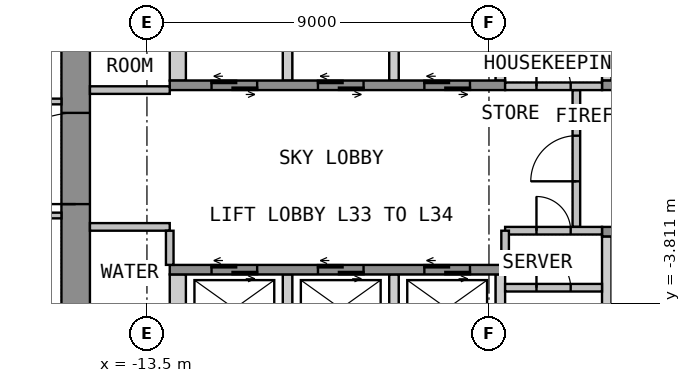
"""IFC4 building model, lengths in metres.
Left out: names, types, materials, properties, quantities, classifications, styles, units other than length and angle.
Written with IfcOpenShell. Run it as: python <this file> out.ifc"""

import sys

from ifc_helpers import new_model, si_unit, direction, frame, frame_2d, origin, place, context, subcontext, project, spatial, polyline, rectangle, outline, extrude, element, fill, save


model = new_model("IFC4")
c1 = context("Model", 3, precision=1e-05, world=origin(), true_north=direction((0.0, 1.0)))
c2 = subcontext(c1, "Body", "Model", "MODEL_VIEW")
j1 = project(units=[si_unit("LENGTHUNIT", "METRE"), si_unit("PLANEANGLEUNIT", "RADIAN")], contexts=[c1])
p1 = place(None, origin())
s1 = spatial("IfcSite", under=j1, at=p1, CompositionType="ELEMENT")
p2 = place(p1, origin())
s2 = spatial("IfcBuilding", under=s1, at=p2, CompositionType="ELEMENT")
p3 = place(p2, frame((0.0, 0.0, 132.6)))
s3 = spatial("IfcBuildingStorey", under=s2, at=p3, CompositionType="ELEMENT", Elevation=132.6)
p4 = place(p3, frame((-15.375, -12.75, 0.0), z_axis=(0.0, 0.0, 1.0), x_axis=(0.0, 1.0, 0.0)))
e1 = element("IfcWall", 1, at=p4, inside=s3, PredefinedType="SHEAR", context=c2, shape_type="SweptSolid", body=[
    extrude(rectangle(XDim=25.5, YDim=0.75, at=frame_2d((12.75, 0.0))), origin(), (0.0, 0.0, 1.0), 3.575),
])
p5 = place(p4, frame((11.55, 0.0, 0.0)))
e2 = element("IfcOpeningElement", 2, at=p5, cuts=e1, PredefinedType="OPENING", context=c2, shape_type="SweptSolid", body=[
    extrude(rectangle(XDim=2.4, YDim=2.1, at=frame_2d((1.2, 1.05))), frame((0.0, 0.385, 0.0), z_axis=(0.0, -1.0, 0.0), x_axis=(1.0, 0.0, 0.0)), (0.0, 0.0, 1.0), 0.77),
])
p6 = place(p3, origin())
e3 = element("IfcWall", 3, at=p6, inside=s3, PredefinedType="SHEAR", context=c2, shape_type="SweptSolid", body=[
    extrude(outline(polyline([(-12.9, 2.05), (-12.475, 2.05), (-12.475, 4.75), (-12.9, 4.75), (-12.9, 2.05)])), origin(), (0.0, 0.0, 1.0), 3.575),
])
p7 = place(p3, origin())
e4 = element("IfcWall", 4, at=p7, inside=s3, PredefinedType="SHEAR", context=c2, shape_type="SweptSolid", body=[
    extrude(outline(polyline([(-9.925, 2.05), (-9.675, 2.05), (-9.675, 4.75), (-9.925, 4.75), (-9.925, 2.05)])), origin(), (0.0, 0.0, 1.0), 3.575),
])
p8 = place(p3, origin())
e5 = element("IfcWall", 5, at=p8, inside=s3, PredefinedType="SHEAR", context=c2, shape_type="SweptSolid", body=[
    extrude(outline(polyline([(-7.125, 2.05), (-6.875, 2.05), (-6.875, 4.75), (-7.125, 4.75), (-7.125, 2.05)])), origin(), (0.0, 0.0, 1.0), 3.575),
])
p9 = place(p3, origin())
e6 = element("IfcWall", 6, at=p9, inside=s3, PredefinedType="SHEAR", context=c2, shape_type="SweptSolid", body=[
    extrude(outline(polyline([(-4.325, 2.05), (-4.075, 2.05), (-4.075, 4.75), (-4.325, 4.75), (-4.325, 2.05)])), origin(), (0.0, 0.0, 1.0), 3.575),
])
p10 = place(p3, origin())
e7 = element("IfcWall", 7, at=p10, inside=s3, PredefinedType="SHEAR", context=c2, shape_type="SweptSolid", body=[
    extrude(outline(polyline([(-1.525, 2.05), (-1.275, 2.05), (-1.275, 4.75), (-1.525, 4.75), (-1.525, 2.05)])), origin(), (0.0, 0.0, 1.0), 3.575),
])
p11 = place(p3, frame((-12.9, 1.925, 0.0), z_axis=(0.0, 0.0, 1.0), x_axis=(1.0, 0.0, 0.0)))
e8 = element("IfcWall", 8, at=p11, inside=s3, PredefinedType="SHEAR", context=c2, shape_type="SweptSolid", body=[
    extrude(rectangle(XDim=8.825, YDim=0.25, at=frame_2d((4.413, 0.0))), origin(), (0.0, 0.0, 1.0), 3.575),
])
p12 = place(p11, frame((1.1, 0.0, 0.0)))
e9 = element("IfcOpeningElement", 9, at=p12, cuts=e8, PredefinedType="OPENING", context=c2, shape_type="SweptSolid", body=[
    extrude(rectangle(XDim=1.2, YDim=2.1, at=frame_2d((0.6, 1.05))), frame((0.0, 0.135, 0.0), z_axis=(0.0, -1.0, 0.0), x_axis=(1.0, 0.0, 0.0)), (0.0, 0.0, 1.0), 0.27),
])
p13 = place(p11, frame((3.9, 0.0, 0.0)))
e10 = element("IfcOpeningElement", 10, at=p13, cuts=e8, PredefinedType="OPENING", context=c2, shape_type="SweptSolid", body=[
    extrude(rectangle(XDim=1.2, YDim=2.1, at=frame_2d((0.6, 1.05))), frame((0.0, 0.135, 0.0), z_axis=(0.0, -1.0, 0.0), x_axis=(1.0, 0.0, 0.0)), (0.0, 0.0, 1.0), 0.27),
])
p14 = place(p11, frame((6.7, 0.0, 0.0)))
e11 = element("IfcOpeningElement", 11, at=p14, cuts=e8, PredefinedType="OPENING", context=c2, shape_type="SweptSolid", body=[
    extrude(rectangle(XDim=1.2, YDim=2.1, at=frame_2d((0.6, 1.05))), frame((0.0, 0.135, 0.0), z_axis=(0.0, -1.0, 0.0), x_axis=(1.0, 0.0, 0.0)), (0.0, 0.0, 1.0), 0.27),
])
p15 = place(p3, frame((-1.525, 1.925, 0.0), z_axis=(0.0, 0.0, 1.0), x_axis=(1.0, 0.0, 0.0)))
e12 = element("IfcWall", 12, at=p15, inside=s3, PredefinedType="SHEAR", context=c2, shape_type="SweptSolid", body=[
    extrude(rectangle(XDim=3.05, YDim=0.25, at=frame_2d((1.525, 0.0))), origin(), (0.0, 0.0, 1.0), 3.575),
])
p16 = place(p15, frame((0.925, 0.0, 0.0)))
e13 = element("IfcOpeningElement", 13, at=p16, cuts=e12, PredefinedType="OPENING", context=c2, shape_type="SweptSolid", body=[
    extrude(rectangle(XDim=1.2, YDim=2.1, at=frame_2d((0.6, 1.05))), frame((0.0, 0.135, 0.0), z_axis=(0.0, -1.0, 0.0), x_axis=(1.0, 0.0, 0.0)), (0.0, 0.0, 1.0), 0.27),
])
p17 = place(p3, origin())
e14 = element("IfcWall", 14, at=p17, inside=s3, PredefinedType="SHEAR", context=c2, shape_type="SweptSolid", body=[
    extrude(outline(polyline([(-12.9, -4.75), (-12.475, -4.75), (-12.475, -3.05), (-12.9, -3.05), (-12.9, -4.75)])), origin(), (0.0, 0.0, 1.0), 3.575),
])
p18 = place(p3, origin())
e15 = element("IfcWall", 15, at=p18, inside=s3, PredefinedType="SHEAR", context=c2, shape_type="SweptSolid", body=[
    extrude(outline(polyline([(-9.925, -4.75), (-9.675, -4.75), (-9.675, -3.05), (-9.925, -3.05), (-9.925, -4.75)])), origin(), (0.0, 0.0, 1.0), 3.575),
])
p19 = place(p3, origin())
e16 = element("IfcWall", 16, at=p19, inside=s3, PredefinedType="SHEAR", context=c2, shape_type="SweptSolid", body=[
    extrude(outline(polyline([(-7.125, -4.75), (-6.875, -4.75), (-6.875, -3.05), (-7.125, -3.05), (-7.125, -4.75)])), origin(), (0.0, 0.0, 1.0), 3.575),
])
p20 = place(p3, origin())
e17 = element("IfcWall", 17, at=p20, inside=s3, PredefinedType="SHEAR", context=c2, shape_type="SweptSolid", body=[
    extrude(outline(polyline([(-4.325, -4.75), (-4.075, -4.75), (-4.075, -3.05), (-4.325, -3.05), (-4.325, -4.75)])), origin(), (0.0, 0.0, 1.0), 3.575),
])
p21 = place(p3, origin())
e18 = element("IfcWall", 18, at=p21, inside=s3, PredefinedType="SHEAR", context=c2, shape_type="SweptSolid", body=[
    extrude(outline(polyline([(-1.525, -4.75), (-1.275, -4.75), (-1.275, -2.05), (-1.525, -2.05), (-1.525, -4.75)])), origin(), (0.0, 0.0, 1.0), 3.575),
])
p22 = place(p3, frame((-12.9, -2.925, 0.0), z_axis=(0.0, 0.0, 1.0), x_axis=(1.0, 0.0, 0.0)))
e19 = element("IfcWall", 19, at=p22, inside=s3, PredefinedType="SHEAR", context=c2, shape_type="SweptSolid", body=[
    extrude(rectangle(XDim=8.825, YDim=0.25, at=frame_2d((4.413, 0.0))), origin(), (0.0, 0.0, 1.0), 3.575),
])
p23 = place(p22, frame((1.1, 0.0, 0.0)))
e20 = element("IfcOpeningElement", 20, at=p23, cuts=e19, PredefinedType="OPENING", context=c2, shape_type="SweptSolid", body=[
    extrude(rectangle(XDim=1.2, YDim=2.1, at=frame_2d((0.6, 1.05))), frame((0.0, 0.135, 0.0), z_axis=(0.0, -1.0, 0.0), x_axis=(1.0, 0.0, 0.0)), (0.0, 0.0, 1.0), 0.27),
])
p24 = place(p22, frame((3.9, 0.0, 0.0)))
e21 = element("IfcOpeningElement", 21, at=p24, cuts=e19, PredefinedType="OPENING", context=c2, shape_type="SweptSolid", body=[
    extrude(rectangle(XDim=1.2, YDim=2.1, at=frame_2d((0.6, 1.05))), frame((0.0, 0.135, 0.0), z_axis=(0.0, -1.0, 0.0), x_axis=(1.0, 0.0, 0.0)), (0.0, 0.0, 1.0), 0.27),
])
p25 = place(p22, frame((6.7, 0.0, 0.0)))
e22 = element("IfcOpeningElement", 22, at=p25, cuts=e19, PredefinedType="OPENING", context=c2, shape_type="SweptSolid", body=[
    extrude(rectangle(XDim=1.2, YDim=2.1, at=frame_2d((0.6, 1.05))), frame((0.0, 0.135, 0.0), z_axis=(0.0, -1.0, 0.0), x_axis=(1.0, 0.0, 0.0)), (0.0, 0.0, 1.0), 0.27),
])
p26 = place(p3, frame((-1.525, -1.925, 0.0), z_axis=(0.0, 0.0, 1.0), x_axis=(1.0, 0.0, 0.0)))
e23 = element("IfcWall", 23, at=p26, inside=s3, PredefinedType="SHEAR", context=c2, shape_type="SweptSolid", body=[
    extrude(rectangle(XDim=14.425, YDim=0.25, at=frame_2d((7.212, 0.0))), origin(), (0.0, 0.0, 1.0), 3.575),
])
p27 = place(p26, frame((0.925, 0.0, 0.0)))
e24 = element("IfcOpeningElement", 24, at=p27, cuts=e23, PredefinedType="OPENING", context=c2, shape_type="SweptSolid", body=[
    extrude(rectangle(XDim=1.2, YDim=2.1, at=frame_2d((0.6, 1.05))), frame((0.0, 0.135, 0.0), z_axis=(0.0, -1.0, 0.0), x_axis=(1.0, 0.0, 0.0)), (0.0, 0.0, 1.0), 0.27),
])
p28 = place(p26, frame((3.725, 0.0, 0.0)))
e25 = element("IfcOpeningElement", 25, at=p28, cuts=e23, PredefinedType="OPENING", context=c2, shape_type="SweptSolid", body=[
    extrude(rectangle(XDim=1.2, YDim=2.1, at=frame_2d((0.6, 1.05))), frame((0.0, 0.135, 0.0), z_axis=(0.0, -1.0, 0.0), x_axis=(1.0, 0.0, 0.0)), (0.0, 0.0, 1.0), 0.27),
])
p29 = place(p3, frame((-2.2, -1.8, 0.0), z_axis=(0.0, 0.0, 1.0), x_axis=(0.0, 1.0, 0.0)))
e26 = element("IfcWall", 26, at=p29, inside=s3, PredefinedType="PARTITIONING", context=c2, shape_type="SweptSolid", body=[
    extrude(rectangle(XDim=3.6, YDim=0.2, at=frame_2d((1.8, 0.0))), origin(), (0.0, 0.0, 1.0), 3.575),
])
p30 = place(p29, frame((1.2, 0.0, 0.0)))
e27 = element("IfcOpeningElement", 27, at=p30, cuts=e26, PredefinedType="OPENING", context=c2, shape_type="SweptSolid", body=[
    extrude(rectangle(XDim=1.2, YDim=2.1, at=frame_2d((0.6, 1.05))), frame((0.0, 0.11, 0.0), z_axis=(0.0, -1.0, 0.0), x_axis=(1.0, 0.0, 0.0)), (0.0, 0.0, 1.0), 0.22),
])
for number, where, z_axis, x_axis in (
    (28, (-15.0, 1.8, 0.0), (0.0, 0.0, 1.0), (1.0, 0.0, 0.0)),
    (29, (-15.0, -1.8, 0.0), (0.0, 0.0, 1.0), (1.0, 0.0, 0.0)),
):
    element("IfcWall", number, at=place(p3, frame(where, z_axis=z_axis, x_axis=x_axis)), inside=s3, PredefinedType="PARTITIONING", context=c2, shape_type="SweptSolid", body=[
        extrude(rectangle(XDim=2.1, YDim=0.2, at=frame_2d((1.05, 0.0))), origin(), (0.0, 0.0, 1.0), 3.575),
    ])
p31 = place(p3, frame((-4.075, 1.9, 0.0), z_axis=(0.0, 0.0, 1.0), x_axis=(1.0, 0.0, 0.0)))
e30 = element("IfcWall", 30, at=p31, inside=s3, PredefinedType="PARTITIONING", context=c2, shape_type="SweptSolid", body=[
    extrude(rectangle(XDim=2.55, YDim=0.2, at=frame_2d((1.275, 0.0))), origin(), (0.0, 0.0, 1.0), 3.575),
])
p32 = place(p31, frame((0.825, 0.0, 0.0)))
e31 = element("IfcOpeningElement", 31, at=p32, cuts=e30, PredefinedType="OPENING", context=c2, shape_type="SweptSolid", body=[
    extrude(rectangle(XDim=0.9, YDim=2.1, at=frame_2d((0.45, 1.05))), frame((0.0, 0.11, 0.0), z_axis=(0.0, -1.0, 0.0), x_axis=(1.0, 0.0, 0.0)), (0.0, 0.0, 1.0), 0.22),
])
p33 = place(p3, frame((-4.075, -3.4, 0.0), z_axis=(0.0, 0.0, 1.0), x_axis=(1.0, 0.0, 0.0)))
e32 = element("IfcWall", 32, at=p33, inside=s3, PredefinedType="PARTITIONING", context=c2, shape_type="SweptSolid", body=[
    extrude(rectangle(XDim=2.55, YDim=0.2, at=frame_2d((1.275, 0.0))), origin(), (0.0, 0.0, 1.0), 3.575),
])
p34 = place(p33, frame((0.825, 0.0, 0.0)))
e33 = element("IfcOpeningElement", 33, at=p34, cuts=e32, PredefinedType="OPENING", context=c2, shape_type="SweptSolid", body=[
    extrude(rectangle(XDim=0.9, YDim=2.1, at=frame_2d((0.45, 1.05))), frame((0.0, 0.11, 0.0), z_axis=(0.0, -1.0, 0.0), x_axis=(1.0, 0.0, 0.0)), (0.0, 0.0, 1.0), 0.22),
])
p35 = place(p3, frame((-4.075, -1.9, 0.0), z_axis=(0.0, 0.0, 1.0), x_axis=(1.0, 0.0, 0.0)))
e34 = element("IfcWall", 34, at=p35, inside=s3, PredefinedType="PARTITIONING", context=c2, shape_type="SweptSolid", body=[
    extrude(rectangle(XDim=2.55, YDim=0.2, at=frame_2d((1.275, 0.0))), origin(), (0.0, 0.0, 1.0), 3.575),
])
p36 = place(p35, frame((0.825, 0.0, 0.0)))
e35 = element("IfcOpeningElement", 35, at=p36, cuts=e34, PredefinedType="OPENING", context=c2, shape_type="SweptSolid", body=[
    extrude(rectangle(XDim=0.9, YDim=2.1, at=frame_2d((0.45, 1.05))), frame((0.0, 0.11, 0.0), z_axis=(0.0, -1.0, 0.0), x_axis=(1.0, 0.0, 0.0)), (0.0, 0.0, 1.0), 0.22),
])
p37 = place(p3, frame((-4.075, -1.9, 0.0), z_axis=(0.0, 0.0, 1.0), x_axis=(0.0, -1.0, 0.0)))
e36 = element("IfcWall", 36, at=p37, inside=s3, PredefinedType="PARTITIONING", context=c2, shape_type="SweptSolid", body=[
    extrude(rectangle(XDim=1.15, YDim=0.2, at=frame_2d((0.575, 0.0))), origin(), (0.0, 0.0, 1.0), 3.575),
])
for number, where, z_axis, x_axis in (
    (37, (-18.675, -1.5, 0.0), (0.0, 0.0, 1.0), (1.0, 0.0, 0.0)),
    (38, (-15.75, 1.5, 0.0), (0.0, 0.0, 1.0), (-1.0, 0.0, 0.0)),
):
    element("IfcWall", number, at=place(p3, frame(where, z_axis=z_axis, x_axis=x_axis)), inside=s3, PredefinedType="PARTITIONING", context=c2, shape_type="SweptSolid", body=[
        extrude(rectangle(XDim=2.925, YDim=0.15, at=frame_2d((1.462, 0.0))), origin(), (0.0, 0.0, 1.0), 3.575),
    ])
p38 = place(p3, frame((-12.9, -2.799, 0.0), z_axis=(0.0, 0.0, 1.0), x_axis=(0.0, 1.0, 0.0)))
e39 = element("IfcWall", 39, at=p38, inside=s3, PredefinedType="PARTITIONING", context=c2, shape_type="SweptSolid", body=[
    extrude(rectangle(XDim=0.898, YDim=0.2, at=frame_2d((0.449, 0.0))), origin(), (0.0, 0.0, 1.0), 3.575),
])
p39 = place(p5, origin())
e40 = element("IfcDoor", 40, at=p39, inside=s3, OperationType="DOUBLE_DOOR_DOUBLE_SWING", PredefinedType="DOOR", context=c2, shape_type="SweptSolid", body=[
    extrude(rectangle(XDim=2.4, YDim=2.1, at=frame_2d((1.2, 1.05))), frame((0.0, 0.025, 0.0), z_axis=(0.0, -1.0, 0.0), x_axis=(1.0, 0.0, 0.0)), (0.0, 0.0, 1.0), 0.05),
])
fill(e2, e40)
p40 = place(p12, origin())
e41 = element("IfcDoor", 41, at=p40, inside=s3, OperationType="DOUBLE_DOOR_SLIDING", PredefinedType="DOOR", context=c2, shape_type="SweptSolid", body=[
    extrude(rectangle(XDim=1.2, YDim=2.1, at=frame_2d((0.6, 1.05))), frame((0.0, 0.025, 0.0), z_axis=(0.0, -1.0, 0.0), x_axis=(1.0, 0.0, 0.0)), (0.0, 0.0, 1.0), 0.05),
])
fill(e9, e41)
p41 = place(p13, origin())
e42 = element("IfcDoor", 42, at=p41, inside=s3, OperationType="DOUBLE_DOOR_SLIDING", PredefinedType="DOOR", context=c2, shape_type="SweptSolid", body=[
    extrude(rectangle(XDim=1.2, YDim=2.1, at=frame_2d((0.6, 1.05))), frame((0.0, 0.025, 0.0), z_axis=(0.0, -1.0, 0.0), x_axis=(1.0, 0.0, 0.0)), (0.0, 0.0, 1.0), 0.05),
])
fill(e10, e42)
p42 = place(p14, origin())
e43 = element("IfcDoor", 43, at=p42, inside=s3, OperationType="DOUBLE_DOOR_SLIDING", PredefinedType="DOOR", context=c2, shape_type="SweptSolid", body=[
    extrude(rectangle(XDim=1.2, YDim=2.1, at=frame_2d((0.6, 1.05))), frame((0.0, 0.025, 0.0), z_axis=(0.0, -1.0, 0.0), x_axis=(1.0, 0.0, 0.0)), (0.0, 0.0, 1.0), 0.05),
])
fill(e11, e43)
p43 = place(p23, origin())
e44 = element("IfcDoor", 44, at=p43, inside=s3, OperationType="DOUBLE_DOOR_SLIDING", PredefinedType="DOOR", context=c2, shape_type="SweptSolid", body=[
    extrude(rectangle(XDim=1.2, YDim=2.1, at=frame_2d((0.6, 1.05))), frame((0.0, 0.025, 0.0), z_axis=(0.0, -1.0, 0.0), x_axis=(1.0, 0.0, 0.0)), (0.0, 0.0, 1.0), 0.05),
])
fill(e20, e44)
p44 = place(p24, origin())
e45 = element("IfcDoor", 45, at=p44, inside=s3, OperationType="DOUBLE_DOOR_SLIDING", PredefinedType="DOOR", context=c2, shape_type="SweptSolid", body=[
    extrude(rectangle(XDim=1.2, YDim=2.1, at=frame_2d((0.6, 1.05))), frame((0.0, 0.025, 0.0), z_axis=(0.0, -1.0, 0.0), x_axis=(1.0, 0.0, 0.0)), (0.0, 0.0, 1.0), 0.05),
])
fill(e21, e45)
p45 = place(p25, origin())
e46 = element("IfcDoor", 46, at=p45, inside=s3, OperationType="DOUBLE_DOOR_SLIDING", PredefinedType="DOOR", context=c2, shape_type="SweptSolid", body=[
    extrude(rectangle(XDim=1.2, YDim=2.1, at=frame_2d((0.6, 1.05))), frame((0.0, 0.025, 0.0), z_axis=(0.0, -1.0, 0.0), x_axis=(1.0, 0.0, 0.0)), (0.0, 0.0, 1.0), 0.05),
])
fill(e22, e46)
p46 = place(p30, origin())
e47 = element("IfcDoor", 47, at=p46, inside=s3, OperationType="SINGLE_SWING_LEFT", PredefinedType="DOOR", context=c2, shape_type="SweptSolid", body=[
    extrude(rectangle(XDim=1.2, YDim=2.1, at=frame_2d((0.6, 1.05))), frame((0.0, 0.025, 0.0), z_axis=(0.0, -1.0, 0.0), x_axis=(1.0, 0.0, 0.0)), (0.0, 0.0, 1.0), 0.05),
])
fill(e27, e47)
p47 = place(p32, origin())
e48 = element("IfcDoor", 48, at=p47, inside=s3, OperationType="SINGLE_SWING_LEFT", PredefinedType="DOOR", context=c2, shape_type="SweptSolid", body=[
    extrude(rectangle(XDim=0.9, YDim=2.1, at=frame_2d((0.45, 1.05))), frame((0.0, 0.025, 0.0), z_axis=(0.0, -1.0, 0.0), x_axis=(1.0, 0.0, 0.0)), (0.0, 0.0, 1.0), 0.05),
])
fill(e31, e48)
p48 = place(p34, origin())
e49 = element("IfcDoor", 49, at=p48, inside=s3, OperationType="SINGLE_SWING_LEFT", PredefinedType="DOOR", context=c2, shape_type="SweptSolid", body=[
    extrude(rectangle(XDim=0.9, YDim=2.1, at=frame_2d((0.45, 1.05))), frame((0.0, 0.025, 0.0), z_axis=(0.0, -1.0, 0.0), x_axis=(1.0, 0.0, 0.0)), (0.0, 0.0, 1.0), 0.05),
])
fill(e33, e49)
p49 = place(p36, origin())
e50 = element("IfcDoor", 50, at=p49, inside=s3, OperationType="SINGLE_SWING_LEFT", PredefinedType="DOOR", context=c2, shape_type="SweptSolid", body=[
    extrude(rectangle(XDim=0.9, YDim=2.1, at=frame_2d((0.45, 1.05))), frame((0.0, 0.025, 0.0), z_axis=(0.0, -1.0, 0.0), x_axis=(1.0, 0.0, 0.0)), (0.0, 0.0, 1.0), 0.05),
])
fill(e35, e50)
save(model, sys.argv[1])
